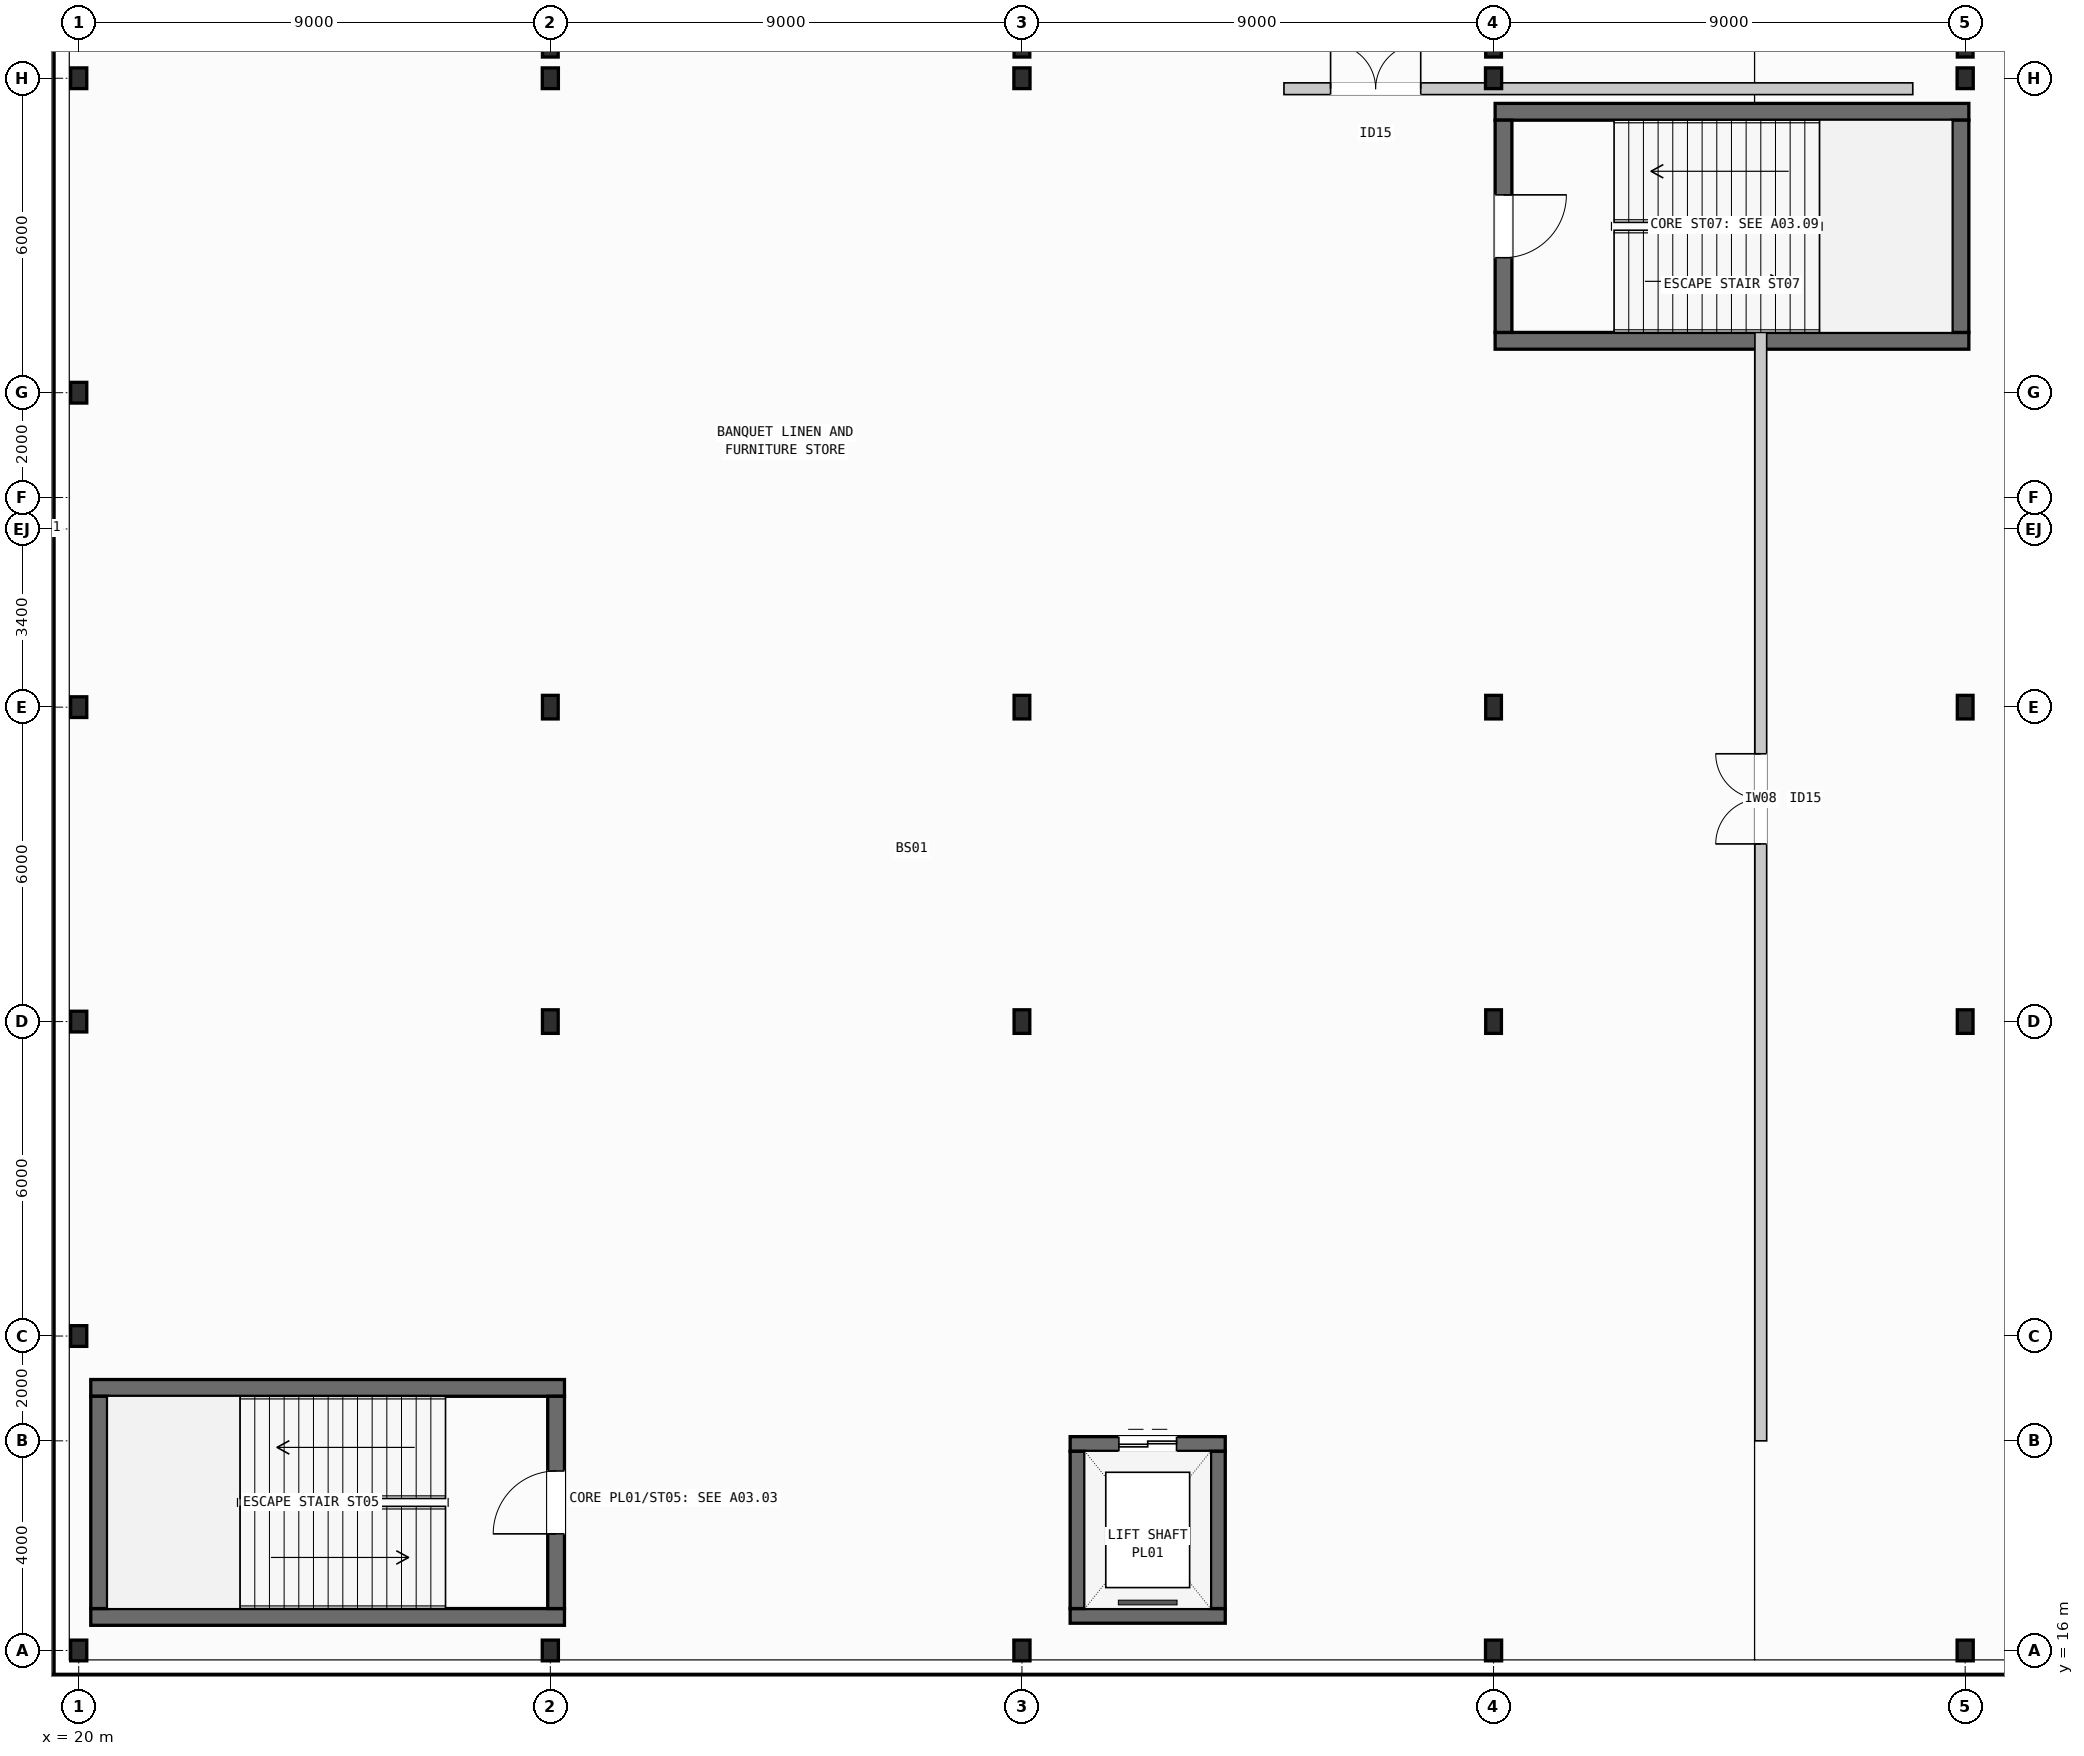
"""IFC4 building model, lengths in metres.
Left out: names, types, materials, properties, quantities, classifications, styles, units other than length and angle.
Written with IfcOpenShell. Run it as: python <this file> out.ifc"""

import sys

from ifc_helpers import new_model, si_unit, direction, frame, frame_2d, origin, origin_2d, place, context, subcontext, project, spatial, rectangle, i_section, extrude, element, fill, save


model = new_model("IFC4")
c1 = context("Model", 3, precision=1e-05, world=origin(), true_north=direction((0.0, 1.0)))
c2 = subcontext(c1, "Body", "Model", "MODEL_VIEW")
j1 = project(units=[si_unit("LENGTHUNIT", "METRE"), si_unit("PLANEANGLEUNIT", "RADIAN")], contexts=[c1])
p1 = place(None, origin())
s1 = spatial("IfcSite", under=j1, at=p1, CompositionType="ELEMENT")
p2 = place(p1, origin())
s2 = spatial("IfcBuilding", under=s1, at=p2, CompositionType="ELEMENT")
p3 = place(p2, frame((0.0, 0.0, -5.4)))
s3 = spatial("IfcBuildingStorey", under=s2, at=p3, CompositionType="ELEMENT", Elevation=-5.4)
for number, where, z_axis, x_axis in (
    (1, (20.0, 16.0, 0.0), (0.0, 0.0, 1.0), (1.0, 0.0, 0.0)),
    (2, (20.0, 22.0, 0.0), (0.0, 0.0, 1.0), (1.0, 0.0, 0.0)),
    (3, (20.0, 28.0, 0.0), (0.0, 0.0, 1.0), (1.0, 0.0, 0.0)),
    (4, (20.0, 34.0, 0.0), (0.0, 0.0, 1.0), (1.0, 0.0, 0.0)),
    (5, (20.0, 40.0, 0.0), (0.0, 0.0, 1.0), (1.0, 0.0, 0.0)),
    (6, (20.0, 46.0, 0.0), (0.0, 0.0, 1.0), (1.0, 0.0, 0.0)),
    (7, (29.0, 16.0, 0.0), (0.0, 0.0, 1.0), (1.0, 0.0, 0.0)),
):
    element("IfcColumn", number, at=place(p3, frame(where, z_axis=z_axis, x_axis=x_axis)), inside=s3, PredefinedType="COLUMN", context=c2, shape_type="SweptSolid", body=[
        extrude(i_section(OverallWidth=0.308, OverallDepth=0.395, WebThickness=0.021, FlangeThickness=0.04, FilletRadius=0.027, at=origin_2d()), origin(), (0.0, 0.0, 1.0), 5.4),
    ])
for number, where, z_axis, x_axis in (
    (8, (29.0, 28.0, 0.0), (0.0, 0.0, 1.0), (1.0, 0.0, 0.0)),
    (9, (29.0, 34.0, 0.0), (0.0, 0.0, 1.0), (1.0, 0.0, 0.0)),
):
    element("IfcColumn", number, at=place(p3, frame(where, z_axis=z_axis, x_axis=x_axis)), inside=s3, PredefinedType="COLUMN", context=c2, shape_type="SweptSolid", body=[
        extrude(i_section(OverallWidth=0.3, OverallDepth=0.45, WebThickness=0.014, FlangeThickness=0.026, FilletRadius=0.027, at=origin_2d()), origin(), (0.0, 0.0, 1.0), 5.4),
    ])
p4 = place(p3, frame((29.0, 46.0, 0.0), z_axis=(0.0, 0.0, 1.0), x_axis=(1.0, 0.0, 0.0)))
e10 = element("IfcColumn", 10, at=p4, inside=s3, PredefinedType="COLUMN", context=c2, shape_type="SweptSolid", body=[
    extrude(i_section(OverallWidth=0.308, OverallDepth=0.395, WebThickness=0.021, FlangeThickness=0.04, FilletRadius=0.027, at=origin_2d()), origin(), (0.0, 0.0, 1.0), 5.4),
])
p5 = place(p3, frame((29.0, 46.6, 0.0), z_axis=(0.0, 0.0, 1.0), x_axis=(1.0, 0.0, 0.0)))
e11 = element("IfcColumn", 11, at=p5, inside=s3, PredefinedType="COLUMN", context=c2, shape_type="SweptSolid", body=[
    extrude(i_section(OverallWidth=0.3, OverallDepth=0.39, WebThickness=0.011, FlangeThickness=0.019, FilletRadius=0.027, at=origin_2d()), origin(), (0.0, 0.0, 1.0), 5.4),
])
p6 = place(p3, frame((38.0, 16.0, 0.0), z_axis=(0.0, 0.0, 1.0), x_axis=(1.0, 0.0, 0.0)))
e12 = element("IfcColumn", 12, at=p6, inside=s3, PredefinedType="COLUMN", context=c2, shape_type="SweptSolid", body=[
    extrude(i_section(OverallWidth=0.308, OverallDepth=0.395, WebThickness=0.021, FlangeThickness=0.04, FilletRadius=0.027, at=origin_2d()), origin(), (0.0, 0.0, 1.0), 5.4),
])
for number, where, z_axis, x_axis in (
    (13, (38.0, 28.0, 0.0), (0.0, 0.0, 1.0), (1.0, 0.0, 0.0)),
    (14, (38.0, 34.0, 0.0), (0.0, 0.0, 1.0), (1.0, 0.0, 0.0)),
):
    element("IfcColumn", number, at=place(p3, frame(where, z_axis=z_axis, x_axis=x_axis)), inside=s3, PredefinedType="COLUMN", context=c2, shape_type="SweptSolid", body=[
        extrude(i_section(OverallWidth=0.3, OverallDepth=0.45, WebThickness=0.014, FlangeThickness=0.026, FilletRadius=0.027, at=origin_2d()), origin(), (0.0, 0.0, 1.0), 5.4),
    ])
p7 = place(p3, frame((38.0, 46.0, 0.0), z_axis=(0.0, 0.0, 1.0), x_axis=(1.0, 0.0, 0.0)))
e15 = element("IfcColumn", 15, at=p7, inside=s3, PredefinedType="COLUMN", context=c2, shape_type="SweptSolid", body=[
    extrude(i_section(OverallWidth=0.308, OverallDepth=0.395, WebThickness=0.021, FlangeThickness=0.04, FilletRadius=0.027, at=origin_2d()), origin(), (0.0, 0.0, 1.0), 5.4),
])
p8 = place(p3, frame((38.0, 46.6, 0.0), z_axis=(0.0, 0.0, 1.0), x_axis=(1.0, 0.0, 0.0)))
e16 = element("IfcColumn", 16, at=p8, inside=s3, PredefinedType="COLUMN", context=c2, shape_type="SweptSolid", body=[
    extrude(i_section(OverallWidth=0.3, OverallDepth=0.39, WebThickness=0.011, FlangeThickness=0.019, FilletRadius=0.027, at=origin_2d()), origin(), (0.0, 0.0, 1.0), 5.4),
])
p9 = place(p3, frame((47.0, 16.0, 0.0), z_axis=(0.0, 0.0, 1.0), x_axis=(1.0, 0.0, 0.0)))
e17 = element("IfcColumn", 17, at=p9, inside=s3, PredefinedType="COLUMN", context=c2, shape_type="SweptSolid", body=[
    extrude(i_section(OverallWidth=0.308, OverallDepth=0.395, WebThickness=0.021, FlangeThickness=0.04, FilletRadius=0.027, at=origin_2d()), origin(), (0.0, 0.0, 1.0), 5.4),
])
for number, where, z_axis, x_axis in (
    (18, (47.0, 28.0, 0.0), (0.0, 0.0, 1.0), (1.0, 0.0, 0.0)),
    (19, (47.0, 34.0, 0.0), (0.0, 0.0, 1.0), (1.0, 0.0, 0.0)),
):
    element("IfcColumn", number, at=place(p3, frame(where, z_axis=z_axis, x_axis=x_axis)), inside=s3, PredefinedType="COLUMN", context=c2, shape_type="SweptSolid", body=[
        extrude(i_section(OverallWidth=0.3, OverallDepth=0.45, WebThickness=0.014, FlangeThickness=0.026, FilletRadius=0.027, at=origin_2d()), origin(), (0.0, 0.0, 1.0), 5.4),
    ])
p10 = place(p3, frame((47.0, 46.0, 0.0), z_axis=(0.0, 0.0, 1.0), x_axis=(1.0, 0.0, 0.0)))
e20 = element("IfcColumn", 20, at=p10, inside=s3, PredefinedType="COLUMN", context=c2, shape_type="SweptSolid", body=[
    extrude(i_section(OverallWidth=0.308, OverallDepth=0.395, WebThickness=0.021, FlangeThickness=0.04, FilletRadius=0.027, at=origin_2d()), origin(), (0.0, 0.0, 1.0), 5.4),
])
p11 = place(p3, frame((47.0, 46.6, 0.0), z_axis=(0.0, 0.0, 1.0), x_axis=(1.0, 0.0, 0.0)))
e21 = element("IfcColumn", 21, at=p11, inside=s3, PredefinedType="COLUMN", context=c2, shape_type="SweptSolid", body=[
    extrude(i_section(OverallWidth=0.3, OverallDepth=0.39, WebThickness=0.011, FlangeThickness=0.019, FilletRadius=0.027, at=origin_2d()), origin(), (0.0, 0.0, 1.0), 5.4),
])
p12 = place(p3, frame((56.0, 16.0, 0.0), z_axis=(0.0, 0.0, 1.0), x_axis=(1.0, 0.0, 0.0)))
e22 = element("IfcColumn", 22, at=p12, inside=s3, PredefinedType="COLUMN", context=c2, shape_type="SweptSolid", body=[
    extrude(i_section(OverallWidth=0.308, OverallDepth=0.395, WebThickness=0.021, FlangeThickness=0.04, FilletRadius=0.027, at=origin_2d()), origin(), (0.0, 0.0, 1.0), 5.4),
])
for number, where, z_axis, x_axis in (
    (23, (56.0, 28.0, 0.0), (0.0, 0.0, 1.0), (1.0, 0.0, 0.0)),
    (24, (56.0, 34.0, 0.0), (0.0, 0.0, 1.0), (1.0, 0.0, 0.0)),
):
    element("IfcColumn", number, at=place(p3, frame(where, z_axis=z_axis, x_axis=x_axis)), inside=s3, PredefinedType="COLUMN", context=c2, shape_type="SweptSolid", body=[
        extrude(i_section(OverallWidth=0.3, OverallDepth=0.45, WebThickness=0.014, FlangeThickness=0.026, FilletRadius=0.027, at=origin_2d()), origin(), (0.0, 0.0, 1.0), 5.4),
    ])
p13 = place(p3, frame((56.0, 46.0, 0.0), z_axis=(0.0, 0.0, 1.0), x_axis=(1.0, 0.0, 0.0)))
e25 = element("IfcColumn", 25, at=p13, inside=s3, PredefinedType="COLUMN", context=c2, shape_type="SweptSolid", body=[
    extrude(i_section(OverallWidth=0.308, OverallDepth=0.395, WebThickness=0.021, FlangeThickness=0.04, FilletRadius=0.027, at=origin_2d()), origin(), (0.0, 0.0, 1.0), 5.4),
])
p14 = place(p3, frame((56.0, 46.6, 0.0), z_axis=(0.0, 0.0, 1.0), x_axis=(1.0, 0.0, 0.0)))
e26 = element("IfcColumn", 26, at=p14, inside=s3, PredefinedType="COLUMN", context=c2, shape_type="SweptSolid", body=[
    extrude(i_section(OverallWidth=0.3, OverallDepth=0.39, WebThickness=0.011, FlangeThickness=0.019, FilletRadius=0.027, at=origin_2d()), origin(), (0.0, 0.0, 1.0), 5.4),
])
for number, where, z_axis, x_axis in (
    (27, (20.23, 16.64, 0.0), (0.0, 0.0, 1.0), (1.0, 0.0, 0.0)),
    (28, (20.23, 21.01, 0.0), (0.0, 0.0, 1.0), (1.0, 0.0, 0.0)),
):
    element("IfcWall", number, at=place(p3, frame(where, z_axis=z_axis, x_axis=x_axis)), inside=s3, PredefinedType="SHEAR", context=c2, shape_type="SweptSolid", body=[
        extrude(rectangle(XDim=9.04, YDim=0.32, at=frame_2d((4.52, 0.0))), origin(), (0.0, 0.0, 1.0), 5.4),
    ])
p15 = place(p3, frame((20.39, 16.8, 0.0), z_axis=(0.0, 0.0, 1.0), x_axis=(0.0, 1.0, 0.0)))
e29 = element("IfcWall", 29, at=p15, inside=s3, PredefinedType="SHEAR", context=c2, shape_type="SweptSolid", body=[
    extrude(rectangle(XDim=4.05, YDim=0.32, at=frame_2d((2.025, 0.0))), origin(), (0.0, 0.0, 1.0), 5.4),
])
p16 = place(p3, frame((29.11, 16.8, 0.0), z_axis=(0.0, 0.0, 1.0), x_axis=(0.0, 1.0, 0.0)))
e30 = element("IfcWall", 30, at=p16, inside=s3, PredefinedType="SHEAR", context=c2, shape_type="SweptSolid", body=[
    extrude(rectangle(XDim=4.05, YDim=0.32, at=frame_2d((2.025, 0.0))), origin(), (0.0, 0.0, 1.0), 5.4),
])
p17 = place(p16, frame((1.425, 0.0, 0.0)))
e31 = element("IfcOpeningElement", 31, at=p17, cuts=e30, PredefinedType="OPENING", context=c2, shape_type="SweptSolid", body=[
    extrude(rectangle(XDim=1.2, YDim=2.2, at=frame_2d((0.6, 1.1))), frame((0.0, 0.17, 0.0), z_axis=(0.0, -1.0, 0.0), x_axis=(1.0, 0.0, 0.0)), (0.0, 0.0, 1.0), 0.34),
])
for number, where, z_axis, x_axis in (
    (32, (47.03, 40.99, 0.0), (0.0, 0.0, 1.0), (1.0, 0.0, 0.0)),
    (33, (47.03, 45.36, 0.0), (0.0, 0.0, 1.0), (1.0, 0.0, 0.0)),
):
    element("IfcWall", number, at=place(p3, frame(where, z_axis=z_axis, x_axis=x_axis)), inside=s3, PredefinedType="SHEAR", context=c2, shape_type="SweptSolid", body=[
        extrude(rectangle(XDim=9.04, YDim=0.32, at=frame_2d((4.52, 0.0))), origin(), (0.0, 0.0, 1.0), 5.4),
    ])
p18 = place(p3, frame((47.19, 41.15, 0.0), z_axis=(0.0, 0.0, 1.0), x_axis=(0.0, 1.0, 0.0)))
e34 = element("IfcWall", 34, at=p18, inside=s3, PredefinedType="SHEAR", context=c2, shape_type="SweptSolid", body=[
    extrude(rectangle(XDim=4.05, YDim=0.32, at=frame_2d((2.025, 0.0))), origin(), (0.0, 0.0, 1.0), 5.4),
])
p19 = place(p18, frame((1.425, 0.0, 0.0)))
e35 = element("IfcOpeningElement", 35, at=p19, cuts=e34, PredefinedType="OPENING", context=c2, shape_type="SweptSolid", body=[
    extrude(rectangle(XDim=1.2, YDim=2.2, at=frame_2d((0.6, 1.1))), frame((0.0, 0.17, 0.0), z_axis=(0.0, -1.0, 0.0), x_axis=(1.0, 0.0, 0.0)), (0.0, 0.0, 1.0), 0.34),
])
p20 = place(p3, frame((55.91, 41.15, 0.0), z_axis=(0.0, 0.0, 1.0), x_axis=(0.0, 1.0, 0.0)))
e36 = element("IfcWall", 36, at=p20, inside=s3, PredefinedType="SHEAR", context=c2, shape_type="SweptSolid", body=[
    extrude(rectangle(XDim=4.05, YDim=0.32, at=frame_2d((2.025, 0.0))), origin(), (0.0, 0.0, 1.0), 5.4),
])
p21 = place(p3, frame((38.92, 16.66, 0.0), z_axis=(0.0, 0.0, 1.0), x_axis=(1.0, 0.0, 0.0)))
e37 = element("IfcWall", 37, at=p21, inside=s3, PredefinedType="SHEAR", context=c2, shape_type="SweptSolid", body=[
    extrude(rectangle(XDim=2.96, YDim=0.28, at=frame_2d((1.48, 0.0))), origin(), (0.0, 0.0, 1.0), 5.4),
])
p22 = place(p3, frame((38.92, 19.94, 0.0), z_axis=(0.0, 0.0, 1.0), x_axis=(1.0, 0.0, 0.0)))
e38 = element("IfcWall", 38, at=p22, inside=s3, PredefinedType="SHEAR", context=c2, shape_type="SweptSolid", body=[
    extrude(rectangle(XDim=2.96, YDim=0.28, at=frame_2d((1.48, 0.0))), origin(), (0.0, 0.0, 1.0), 5.4),
])
p23 = place(p22, frame((0.93, 0.0, 0.0)))
e39 = element("IfcOpeningElement", 39, at=p23, cuts=e38, PredefinedType="OPENING", context=c2, shape_type="SweptSolid", body=[
    extrude(rectangle(XDim=1.1, YDim=2.15, at=frame_2d((0.55, 1.075))), frame((0.0, 0.15, 0.0), z_axis=(0.0, -1.0, 0.0), x_axis=(1.0, 0.0, 0.0)), (0.0, 0.0, 1.0), 0.3),
])
for number, where, z_axis, x_axis in (
    (40, (39.06, 16.8, 0.0), (0.0, 0.0, 1.0), (0.0, 1.0, 0.0)),
    (41, (41.74, 16.8, 0.0), (0.0, 0.0, 1.0), (0.0, 1.0, 0.0)),
):
    element("IfcWall", number, at=place(p3, frame(where, z_axis=z_axis, x_axis=x_axis)), inside=s3, PredefinedType="SHEAR", context=c2, shape_type="SweptSolid", body=[
        extrude(rectangle(XDim=3.0, YDim=0.28, at=frame_2d((1.5, 0.0))), origin(), (0.0, 0.0, 1.0), 5.4),
    ])
p24 = place(p3, frame((19.35, 15.522, 0.0), z_axis=(0.0, 0.0, 1.0), x_axis=(0.0, 1.0, 0.0)))
e42 = element("IfcWall", 42, at=p24, inside=s3, PredefinedType="SOLIDWALL", context=c2, shape_type="SweptSolid", body=[
    extrude(rectangle(XDim=58.956, YDim=0.36, at=frame_2d((29.478, 0.0))), origin(), (0.0, 0.0, 1.0), 5.048),
])
p25 = place(p3, frame((204.845, 15.35, 0.0), z_axis=(0.0, 0.0, 1.0), x_axis=(-1.0, 0.0, 0.0)))
e43 = element("IfcWall", 43, at=p25, inside=s3, PredefinedType="SOLIDWALL", context=c2, shape_type="SweptSolid", body=[
    extrude(rectangle(XDim=185.69, YDim=0.39, at=frame_2d((92.845, 0.0))), origin(), (0.0, 0.0, 1.0), 5.048),
])
p26 = place(p3, frame((43.0, 45.8, 0.0), z_axis=(0.0, 0.0, 1.0), x_axis=(1.0, 0.0, 0.0)))
e44 = element("IfcWall", 44, at=p26, inside=s3, PredefinedType="PARTITIONING", context=c2, shape_type="SweptSolid", body=[
    extrude(rectangle(XDim=12.0, YDim=0.224, at=frame_2d((6.0, 0.0))), origin(), (0.0, 0.0, 1.0), 4.4),
])
p27 = place(p26, frame((0.89, 0.0, 0.0)))
e45 = element("IfcOpeningElement", 45, at=p27, cuts=e44, PredefinedType="OPENING", context=c2, shape_type="SweptSolid", body=[
    extrude(rectangle(XDim=1.72, YDim=2.28, at=frame_2d((0.86, 1.14))), frame((0.0, 0.122, 0.0), z_axis=(0.0, -1.0, 0.0), x_axis=(1.0, 0.0, 0.0)), (0.0, 0.0, 1.0), 0.244),
])
p28 = place(p3, frame((52.1, 20.0, 0.0), z_axis=(0.0, 0.0, 1.0), x_axis=(0.0, 1.0, 0.0)))
e46 = element("IfcWall", 46, at=p28, inside=s3, PredefinedType="PARTITIONING", context=c2, shape_type="SweptSolid", body=[
    extrude(rectangle(XDim=24.5, YDim=0.224, at=frame_2d((12.25, 0.0))), origin(), (0.0, 0.0, 1.0), 4.4),
])
p29 = place(p28, frame((11.39, 0.0, 0.0)))
e47 = element("IfcOpeningElement", 47, at=p29, cuts=e46, PredefinedType="OPENING", context=c2, shape_type="SweptSolid", body=[
    extrude(rectangle(XDim=1.72, YDim=2.28, at=frame_2d((0.86, 1.14))), frame((0.0, 0.122, 0.0), z_axis=(0.0, -1.0, 0.0), x_axis=(1.0, 0.0, 0.0)), (0.0, 0.0, 1.0), 0.244),
])
p30 = place(p17, origin())
e48 = element("IfcDoor", 48, at=p30, inside=s3, OperationType="SINGLE_SWING_LEFT", PredefinedType="DOOR", context=c2, shape_type="SweptSolid", body=[
    extrude(rectangle(XDim=1.2, YDim=2.2, at=frame_2d((0.6, 1.1))), frame((0.0, 0.025, 0.0), z_axis=(0.0, -1.0, 0.0), x_axis=(1.0, 0.0, 0.0)), (0.0, 0.0, 1.0), 0.05),
])
fill(e31, e48)
p31 = place(p19, frame((1.2, 0.0, 0.0), z_axis=(0.0, 0.0, 1.0), x_axis=(-1.0, 0.0, 0.0)))
e49 = element("IfcDoor", 49, at=p31, inside=s3, OperationType="SINGLE_SWING_LEFT", PredefinedType="DOOR", context=c2, shape_type="SweptSolid", body=[
    extrude(rectangle(XDim=1.2, YDim=2.2, at=frame_2d((0.6, 1.1))), frame((0.0, 0.025, 0.0), z_axis=(0.0, -1.0, 0.0), x_axis=(1.0, 0.0, 0.0)), (0.0, 0.0, 1.0), 0.05),
])
fill(e35, e49)
p32 = place(p23, origin())
e50 = element("IfcDoor", 50, at=p32, inside=s3, OperationType="DOUBLE_DOOR_SLIDING", PredefinedType="DOOR", context=c2, shape_type="SweptSolid", body=[
    extrude(rectangle(XDim=1.1, YDim=2.15, at=frame_2d((0.55, 1.075))), frame((0.0, 0.025, 0.0), z_axis=(0.0, -1.0, 0.0), x_axis=(1.0, 0.0, 0.0)), (0.0, 0.0, 1.0), 0.05),
])
fill(e39, e50)
p33 = place(p27, origin())
e51 = element("IfcDoor", 51, at=p33, inside=s3, OperationType="DOUBLE_DOOR_SINGLE_SWING", PredefinedType="DOOR", context=c2, shape_type="SweptSolid", body=[
    extrude(rectangle(XDim=1.72, YDim=2.28, at=frame_2d((0.86, 1.14))), frame((0.0, 0.025, 0.0), z_axis=(0.0, -1.0, 0.0), x_axis=(1.0, 0.0, 0.0)), (0.0, 0.0, 1.0), 0.05),
])
fill(e45, e51)
p34 = place(p29, origin())
e52 = element("IfcDoor", 52, at=p34, inside=s3, OperationType="DOUBLE_DOOR_SINGLE_SWING", PredefinedType="DOOR", context=c2, shape_type="SweptSolid", body=[
    extrude(rectangle(XDim=1.72, YDim=2.28, at=frame_2d((0.86, 1.14))), frame((0.0, 0.025, 0.0), z_axis=(0.0, -1.0, 0.0), x_axis=(1.0, 0.0, 0.0)), (0.0, 0.0, 1.0), 0.05),
])
fill(e47, e52)
save(model, sys.argv[1])
